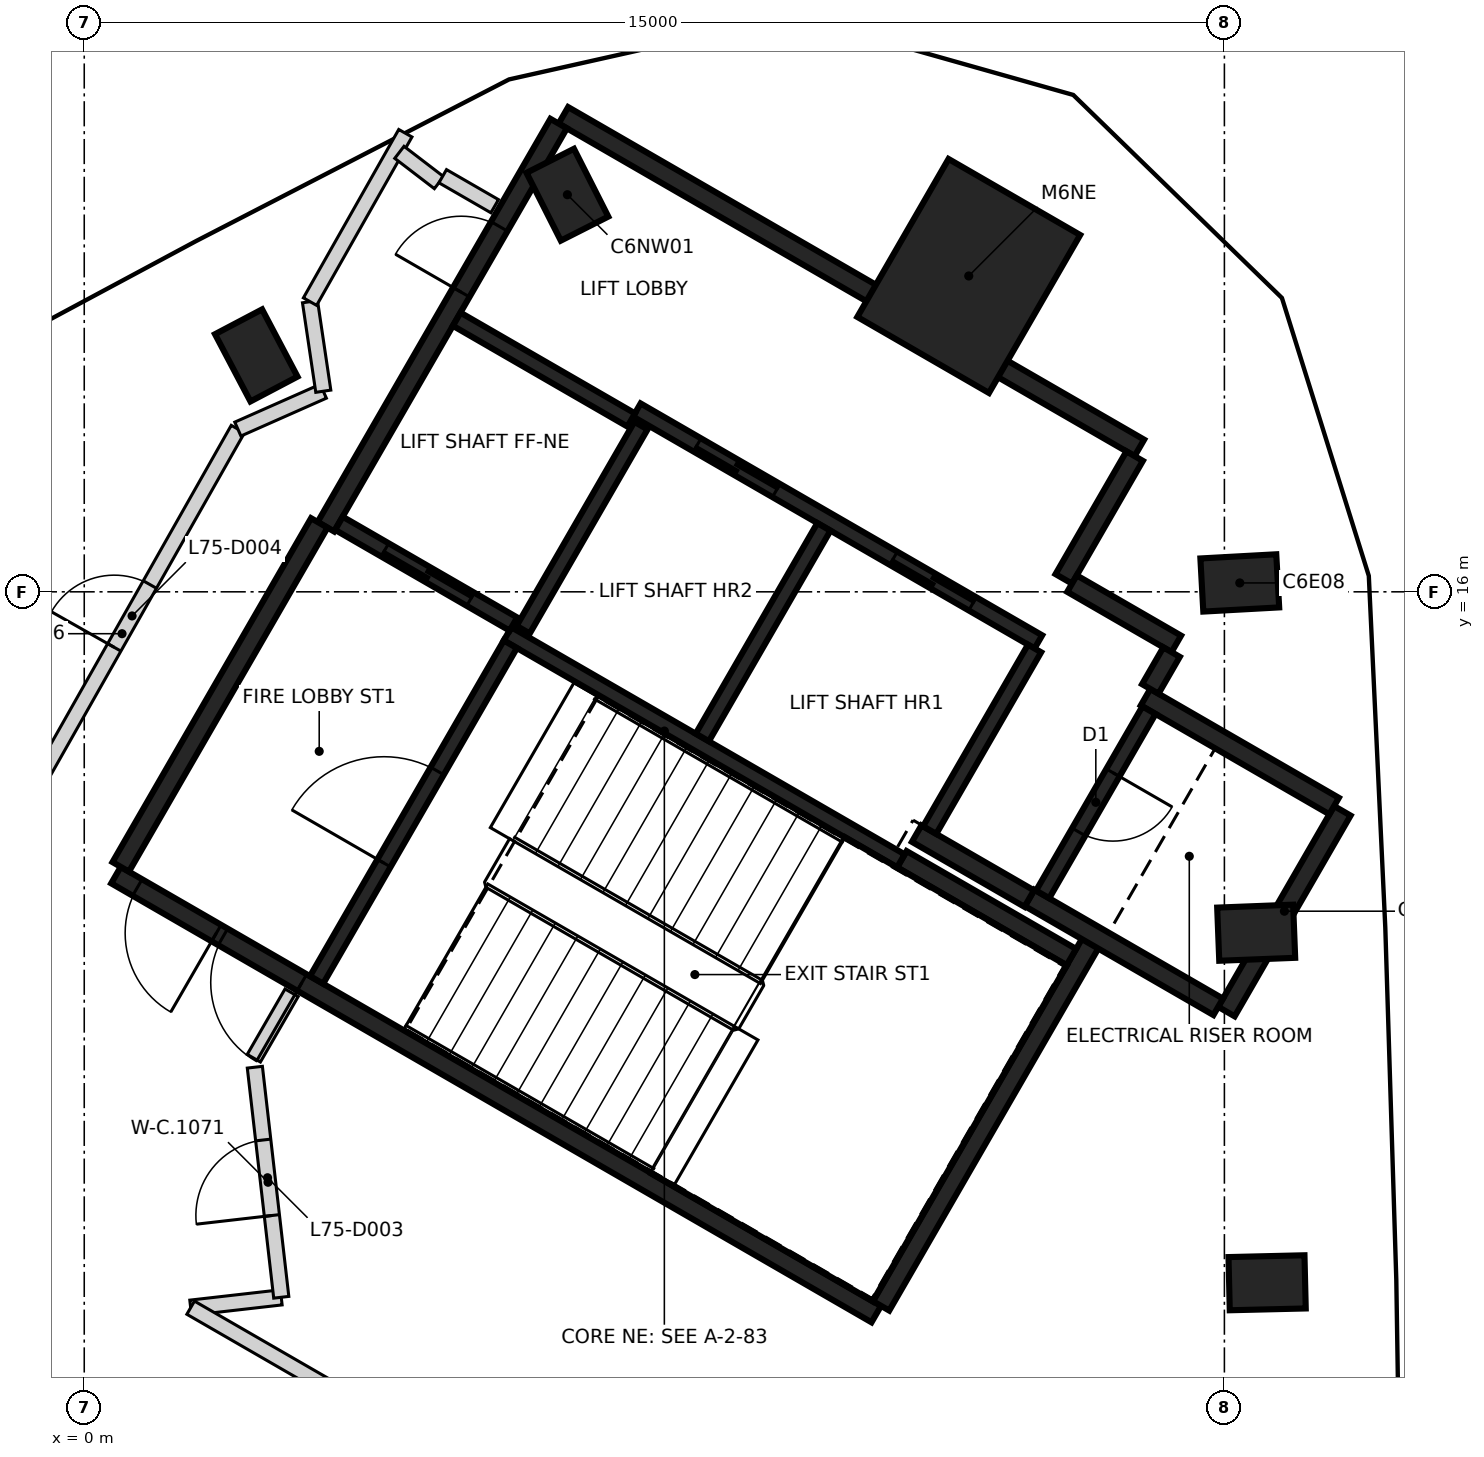
"""IFC4 building model, lengths in metres.
Left out: names, types, materials, properties, quantities, classifications, styles, units other than length and angle.
Written with IfcOpenShell. Run it as: python <this file> out.ifc"""

import sys

from ifc_helpers import new_model, si_unit, direction, frame, frame_2d, origin, origin_2d, place, context, subcontext, project, spatial, rectangle, extrude, element, fill, save


model = new_model("IFC4")
c1 = context("Model", 3, precision=1e-05, world=origin(), true_north=direction((0.0, 1.0)))
c2 = subcontext(c1, "Body", "Model", "MODEL_VIEW")
j1 = project(units=[si_unit("LENGTHUNIT", "METRE"), si_unit("PLANEANGLEUNIT", "RADIAN")], contexts=[c1])
p1 = place(None, origin())
s1 = spatial("IfcSite", under=j1, at=p1, CompositionType="ELEMENT")
p2 = place(p1, origin())
s2 = spatial("IfcBuilding", under=s1, at=p2, CompositionType="ELEMENT")
p3 = place(p2, frame((0.0, 0.0, 298.2)))
s3 = spatial("IfcBuildingStorey", under=s2, at=p3, CompositionType="ELEMENT", Elevation=298.2)
for number, where, z_axis, x_axis in (
    (1, (15.562, 6.91, -0.35), (0.0, 0.0, 1.0), (1.0, 0.024, 0.0)),
    (2, (15.418, 11.515, -0.35), (0.0, 0.0, 1.0), (0.999, 0.039, 0.0)),
    (3, (15.202, 16.117, -0.35), (0.0, 0.0, 1.0), (0.998, 0.055, 0.0)),
    (4, (6.356, 21.224, -0.35), (0.0, 0.0, 1.0), (-0.452, 0.892, 0.0)),
    (5, (2.263, 19.11, -0.35), (0.0, 0.0, 1.0), (-0.466, 0.885, 0.0)),
):
    element("IfcColumn", number, at=place(p3, frame(where, z_axis=z_axis, x_axis=x_axis)), inside=s3, PredefinedType="COLUMN", context=c2, shape_type="SweptSolid", body=[
        extrude(rectangle(XDim=1.0, YDim=0.7, at=origin_2d()), origin(), (0.0, 0.0, 1.0), 2.64),
    ])
p4 = place(p3, frame((11.637, 20.155, -0.35), z_axis=(0.0, 0.0, 1.0), x_axis=(0.5, 0.866025403784, 0.0)))
e6 = element("IfcColumn", 6, at=p4, inside=s3, PredefinedType="COLUMN", context=c2, shape_type="SweptSolid", body=[
    extrude(rectangle(XDim=2.4, YDim=2.0, at=origin_2d()), origin(), (0.0, 0.0, 1.0), 3.55),
])
p5 = place(p3, frame((10.42, 6.498, 0.0), z_axis=(0.0, 0.0, 1.0), x_axis=(-0.866021906294, 0.500006057782, 0.0)))
e7 = element("IfcWall", 7, at=p5, inside=s3, PredefinedType="SHEAR", context=c2, shape_type="SweptSolid", body=[
    extrude(rectangle(XDim=11.55, YDim=0.25, at=frame_2d((5.775, 0.0))), origin(), (0.0, 0.0, 1.0), 3.2),
])
p6 = place(p5, frame((10.025, 0.0, 0.0)))
e8 = element("IfcOpeningElement", 8, at=p6, cuts=e7, PredefinedType="OPENING", context=c2, shape_type="SweptSolid", body=[
    extrude(rectangle(XDim=1.2, YDim=2.1, at=frame_2d((0.6, 1.05))), frame((0.0, 0.135, 0.0), z_axis=(0.0, -1.0, 0.0), x_axis=(1.0, 0.0, 0.0)), (0.0, 0.0, 1.0), 0.27),
])
p7 = place(p5, frame((8.725, 0.0, 0.0)))
e9 = element("IfcOpeningElement", 9, at=p7, cuts=e7, PredefinedType="OPENING", context=c2, shape_type="SweptSolid", body=[
    extrude(rectangle(XDim=1.2, YDim=2.1, at=frame_2d((0.6, 1.05))), frame((0.0, 0.135, 0.0), z_axis=(0.0, -1.0, 0.0), x_axis=(1.0, 0.0, 0.0)), (0.0, 0.0, 1.0), 0.27),
])
p8 = place(p3, frame((6.304, 22.269, 0.0), z_axis=(0.0, 0.0, 1.0), x_axis=(0.866022959057, -0.500004234368, 0.0)))
e10 = element("IfcWall", 10, at=p8, inside=s3, PredefinedType="SHEAR", context=c2, shape_type="SweptSolid", body=[
    extrude(rectangle(XDim=8.75, YDim=0.25, at=frame_2d((4.375, 0.0))), origin(), (0.0, 0.0, 1.0), 3.2),
])
p9 = place(p3, frame((3.179, 16.856, 0.0), z_axis=(0.0, 0.0, 1.0), x_axis=(0.500001955336, 0.866024274868, 0.0)))
e11 = element("IfcWall", 11, at=p9, inside=s3, PredefinedType="SHEAR", context=c2, shape_type="SweptSolid", body=[
    extrude(rectangle(XDim=6.125, YDim=0.25, at=frame_2d((3.062, 0.0))), origin(), (0.0, 0.0, 1.0), 3.2),
])
p10 = place(p9, frame((3.563, 0.0, 0.0)))
e12 = element("IfcOpeningElement", 12, at=p10, cuts=e11, PredefinedType="OPENING", context=c2, shape_type="SweptSolid", body=[
    extrude(rectangle(XDim=1.0, YDim=2.1, at=frame_2d((0.5, 1.05))), frame((0.0, 0.135, 0.0), z_axis=(0.0, -1.0, 0.0), x_axis=(1.0, 0.0, 0.0)), (0.0, 0.0, 1.0), 0.27),
])
p11 = place(p3, frame((0.48, 12.381, 0.0), z_axis=(0.0, 0.0, 1.0), x_axis=(0.49999885962, 0.866026062182, 0.0)))
e13 = element("IfcWall", 13, at=p11, inside=s3, PredefinedType="SHEAR", context=c2, shape_type="SweptSolid", body=[
    extrude(rectangle(XDim=5.225, YDim=0.25, at=frame_2d((2.612, 0.0))), origin(), (0.0, 0.0, 1.0), 3.2),
])
p12 = place(p3, frame((13.238, 11.378, 0.0), z_axis=(0.0, 0.0, 1.0), x_axis=(-0.500008851346, -0.866020293397, 0.0)))
e14 = element("IfcWall", 14, at=p12, inside=s3, PredefinedType="SHEAR", context=c2, shape_type="SweptSolid", body=[
    extrude(rectangle(XDim=5.51, YDim=0.25, at=frame_2d((2.755, 0.0))), origin(), (0.0, 0.0, 1.0), 3.2),
])
p13 = place(p3, frame((16.552, 13.119, 0.0), z_axis=(0.0, 0.0, 1.0), x_axis=(-0.499978833458, -0.866037623948, 0.0)))
e15 = element("IfcWall", 15, at=p13, inside=s3, PredefinedType="SHEAR", context=c2, shape_type="SweptSolid", body=[
    extrude(rectangle(XDim=3.05, YDim=0.25, at=frame_2d((1.525, 0.0))), origin(), (0.0, 0.0, 1.0), 3.2),
])
p14 = place(p3, frame((14.918, 10.54, 0.0), z_axis=(0.0, 0.0, 1.0), x_axis=(-0.866063538972, 0.499933942099, 0.0)))
e16 = element("IfcWall", 16, at=p14, inside=s3, PredefinedType="SHEAR", context=c2, shape_type="SweptSolid", body=[
    extrude(rectangle(XDim=2.865, YDim=0.25, at=frame_2d((1.432, 0.0))), origin(), (0.0, 0.0, 1.0), 3.2),
])
p15 = place(p3, frame((13.963, 14.614, 0.0), z_axis=(0.0, 0.0, 1.0), x_axis=(0.866042235819, -0.499970844928, 0.0)))
e17 = element("IfcWall", 17, at=p15, inside=s3, PredefinedType="SHEAR", context=c2, shape_type="SweptSolid", body=[
    extrude(rectangle(XDim=2.865, YDim=0.25, at=frame_2d((1.432, 0.0))), origin(), (0.0, 0.0, 1.0), 3.2),
])
p16 = place(p3, frame((10.757, 12.481, 0.0), z_axis=(0.0, 0.0, 1.0), x_axis=(0.866022940537, -0.500004266446, 0.0)))
e18 = element("IfcWall", 18, at=p16, inside=s3, PredefinedType="SHEAR", context=c2, shape_type="SweptSolid", body=[
    extrude(rectangle(XDim=2.575, YDim=0.25, at=frame_2d((1.287, 0.0))), origin(), (0.0, 0.0, 1.0), 3.2),
])
p17 = place(p3, frame((13.819, 17.785, 0.0), z_axis=(0.0, 0.0, 1.0), x_axis=(-0.500039802285, -0.866002422705, 0.0)))
e19 = element("IfcWall", 19, at=p17, inside=s3, PredefinedType="SHEAR", context=c2, shape_type="SweptSolid", body=[
    extrude(rectangle(XDim=1.865, YDim=0.25, at=frame_2d((0.932, 0.0))), origin(), (0.0, 0.0, 1.0), 3.2),
])
p18 = place(p3, frame((12.433, 11.964, 0.0), z_axis=(0.0, 0.0, 1.0), x_axis=(-0.866038183914, 0.499977863513, 0.0)))
e20 = element("IfcWall", 20, at=p18, inside=s3, PredefinedType="SHEAR", context=c2, shape_type="SweptSolid", body=[
    extrude(rectangle(XDim=1.71, YDim=0.25, at=frame_2d((0.855, 0.0))), origin(), (0.0, 0.0, 1.0), 3.2),
])
p19 = place(p3, frame((12.995, 16.108, 0.0), z_axis=(0.0, 0.0, 1.0), x_axis=(0.866044474677, -0.49996696679, 0.0)))
e21 = element("IfcWall", 21, at=p19, inside=s3, PredefinedType="SHEAR", context=c2, shape_type="SweptSolid", body=[
    extrude(rectangle(XDim=1.584, YDim=0.25, at=frame_2d((0.792, 0.0))), origin(), (0.0, 0.0, 1.0), 3.2),
])
p20 = place(p3, frame((14.305, 15.207, 0.0), z_axis=(0.0, 0.0, 1.0), x_axis=(-0.499848422343, -0.866112899501, 0.0)))
e22 = element("IfcWall", 22, at=p20, inside=s3, PredefinedType="SHEAR", context=c2, shape_type="SweptSolid", body=[
    extrude(rectangle(XDim=0.559, YDim=0.25, at=frame_2d((0.28, 0.0))), origin(), (0.0, 0.0, 1.0), 3.2),
])
p21 = place(p3, frame((12.552, 15.342, 0.0), z_axis=(0.0, 0.0, 1.0), x_axis=(-0.866030299012, 0.499991521122, 0.0)))
e23 = element("IfcWall", 23, at=p21, inside=s3, PredefinedType="SHEAR", context=c2, shape_type="SweptSolid", body=[
    extrude(rectangle(XDim=6.1, YDim=0.2, at=frame_2d((3.05, 0.0))), origin(), (0.0, 0.0, 1.0), 3.2),
])
p22 = place(p21, frame((1.0, 0.0, 0.0)))
e24 = element("IfcOpeningElement", 24, at=p22, cuts=e23, PredefinedType="OPENING", context=c2, shape_type="SweptSolid", body=[
    extrude(rectangle(XDim=1.2, YDim=2.1, at=frame_2d((0.6, 1.05))), frame((0.0, 0.11, 0.0), z_axis=(0.0, -1.0, 0.0), x_axis=(1.0, 0.0, 0.0)), (0.0, 0.0, 1.0), 0.22),
])
p23 = place(p21, frame((3.982, 0.0, 0.0)))
e25 = element("IfcOpeningElement", 25, at=p23, cuts=e23, PredefinedType="OPENING", context=c2, shape_type="SweptSolid", body=[
    extrude(rectangle(XDim=1.2, YDim=2.1, at=frame_2d((0.6, 1.05))), frame((0.0, 0.11, 0.0), z_axis=(0.0, -1.0, 0.0), x_axis=(1.0, 0.0, 0.0)), (0.0, 0.0, 1.0), 0.22),
])
p24 = place(p3, frame((10.743, 12.46, 0.0), z_axis=(0.0, 0.0, 1.0), x_axis=(-0.866018848283, 0.500011354289, 0.0)))
e26 = element("IfcWall", 26, at=p24, inside=s3, PredefinedType="SHEAR", context=c2, shape_type="SweptSolid", body=[
    extrude(rectangle(XDim=5.974, YDim=0.2, at=frame_2d((2.987, 0.0))), origin(), (0.0, 0.0, 1.0), 3.2),
])
p25 = place(p3, frame((3.057, 10.895, 0.0), z_axis=(0.0, 0.0, 1.0), x_axis=(0.500027839223, 0.866009330205, 0.0)))
e27 = element("IfcWall", 27, at=p25, inside=s3, PredefinedType="SHEAR", context=c2, shape_type="SweptSolid", body=[
    extrude(rectangle(XDim=5.098, YDim=0.2, at=frame_2d((2.549, 0.0))), origin(), (0.0, 0.0, 1.0), 3.2),
])
p26 = place(p25, frame((1.774, 0.0, 0.0)))
e28 = element("IfcOpeningElement", 28, at=p26, cuts=e27, PredefinedType="OPENING", context=c2, shape_type="SweptSolid", body=[
    extrude(rectangle(XDim=1.4, YDim=2.1, at=frame_2d((0.7, 1.05))), frame((0.0, 0.11, 0.0), z_axis=(0.0, -1.0, 0.0), x_axis=(1.0, 0.0, 0.0)), (0.0, 0.0, 1.0), 0.22),
])
p27 = place(p3, frame((8.132, 14.084, 0.0), z_axis=(0.0, 0.0, 1.0), x_axis=(0.500030834389, 0.86600760081, 0.0)))
e29 = element("IfcWall", 29, at=p27, inside=s3, PredefinedType="SHEAR", context=c2, shape_type="SweptSolid", body=[
    extrude(rectangle(XDim=3.198, YDim=0.2, at=frame_2d((1.599, 0.0))), origin(), (0.0, 0.0, 1.0), 3.2),
])
p28 = place(p3, frame((14.008, 14.442, 0.0), z_axis=(0.0, 0.0, 1.0), x_axis=(-0.499986818241, -0.866033014143, 0.0)))
e30 = element("IfcWall", 30, at=p28, inside=s3, PredefinedType="SHEAR", context=c2, shape_type="SweptSolid", body=[
    extrude(rectangle(XDim=2.798, YDim=0.2, at=frame_2d((1.399, 0.0))), origin(), (0.0, 0.0, 1.0), 3.2),
])
p29 = place(p28, frame((0.949, 0.0, 0.0)))
e31 = element("IfcOpeningElement", 31, at=p29, cuts=e30, PredefinedType="OPENING", context=c2, shape_type="SweptSolid", body=[
    extrude(rectangle(XDim=0.9, YDim=2.1, at=frame_2d((0.45, 1.05))), frame((0.0, 0.11, 0.0), z_axis=(0.0, -1.0, 0.0), x_axis=(1.0, 0.0, 0.0)), (0.0, 0.0, 1.0), 0.22),
])
p30 = place(p3, frame((12.502, 15.255, 0.0), z_axis=(0.0, 0.0, 1.0), x_axis=(-0.499965018551, -0.866045599391, 0.0)))
e32 = element("IfcWall", 32, at=p30, inside=s3, PredefinedType="SHEAR", context=c2, shape_type="SweptSolid", body=[
    extrude(rectangle(XDim=2.759, YDim=0.2, at=frame_2d((1.379, 0.0))), origin(), (0.0, 0.0, 1.0), 3.2),
])
p31 = place(p3, frame((7.324, 18.187, 0.0), z_axis=(0.0, 0.0, 1.0), x_axis=(-0.499967891604, -0.866043940782, 0.0)))
e33 = element("IfcWall", 33, at=p31, inside=s3, PredefinedType="SHEAR", context=c2, shape_type="SweptSolid", body=[
    extrude(rectangle(XDim=3.1, YDim=0.2, at=frame_2d((1.55, 0.0))), origin(), (0.0, 0.0, 1.0), 3.2),
])
p32 = place(p3, frame((5.646, 15.576, 0.0), z_axis=(0.0, 0.0, 1.0), x_axis=(-0.866018407898, 0.500012117035, 0.0)))
e34 = element("IfcWall", 34, at=p32, inside=s3, PredefinedType="SHEAR", context=c2, shape_type="SweptSolid", body=[
    extrude(rectangle(XDim=2.651, YDim=0.2, at=frame_2d((1.325, 0.0))), origin(), (0.0, 0.0, 1.0), 3.2),
])
p33 = place(p32, frame((0.652, 0.0, 0.0)))
e35 = element("IfcOpeningElement", 35, at=p33, cuts=e34, PredefinedType="OPENING", context=c2, shape_type="SweptSolid", body=[
    extrude(rectangle(XDim=1.3, YDim=2.1, at=frame_2d((0.65, 1.05))), frame((0.0, 0.11, 0.0), z_axis=(0.0, -1.0, 0.0), x_axis=(1.0, 0.0, 0.0)), (0.0, 0.0, 1.0), 0.22),
])
p34 = place(p3, frame((7.196, 18.26, 0.0), z_axis=(0.0, 0.0, 1.0), x_axis=(-0.866018407898, 0.500012117035, 0.0)))
e36 = element("IfcWall", 36, at=p34, inside=s3, PredefinedType="SHEAR", context=c2, shape_type="SweptSolid", body=[
    extrude(rectangle(XDim=2.651, YDim=0.2, at=frame_2d((1.325, 0.0))), origin(), (0.0, 0.0, 1.0), 3.2),
])
p35 = place(p3, frame((-1.027, 12.757, 0.0), z_axis=(0.0, 0.0, 1.0), x_axis=(0.492663063759, 0.870220147783, 0.0)))
e37 = element("IfcWall", 37, at=p35, inside=s3, PredefinedType="PARTITIONING", context=c2, shape_type="SweptSolid", body=[
    extrude(rectangle(XDim=6.187, YDim=0.2, at=frame_2d((3.094, 0.0))), origin(), (0.0, 0.0, 1.0), 3.2),
])
p36 = place(p35, frame((2.887, 0.0, 0.0)))
e38 = element("IfcOpeningElement", 38, at=p36, cuts=e37, PredefinedType="OPENING", context=c2, shape_type="SweptSolid", body=[
    extrude(rectangle(XDim=0.95, YDim=2.1, at=frame_2d((0.475, 1.05))), frame((0.0, 0.11, 0.0), z_axis=(0.0, -1.0, 0.0), x_axis=(1.0, 0.0, 0.0)), (0.0, 0.0, 1.0), 0.22),
])
p37 = place(p3, frame((1.4, 6.582, 0.0), z_axis=(0.0, 0.0, 1.0), x_axis=(0.993556915844, 0.11333426216, 0.0)))
e39 = element("IfcWall", 39, at=p37, inside=s3, PredefinedType="PARTITIONING", context=c2, shape_type="SweptSolid", body=[
    extrude(rectangle(XDim=1.2, YDim=0.2, at=frame_2d((0.6, 0.0))), origin(), (0.0, 0.0, 1.0), 3.2),
])
p38 = place(p3, frame((1.4, 6.582, 0.0), z_axis=(0.0, 0.0, 1.0), x_axis=(0.866066271601, -0.499929208183, 0.0)))
e40 = element("IfcWall", 40, at=p38, inside=s3, PredefinedType="PARTITIONING", context=c2, shape_type="SweptSolid", body=[
    extrude(rectangle(XDim=2.078, YDim=0.2, at=frame_2d((1.039, 0.0))), origin(), (0.0, 0.0, 1.0), 3.2),
])
p39 = place(p3, frame((2.021, 18.141, 0.0), z_axis=(0.0, 0.0, 1.0), x_axis=(0.914343087003, 0.404940389748, 0.0)))
e41 = element("IfcWall", 41, at=p39, inside=s3, PredefinedType="PARTITIONING", context=c2, shape_type="SweptSolid", body=[
    extrude(rectangle(XDim=1.229, YDim=0.2, at=frame_2d((0.615, 0.0))), origin(), (0.0, 0.0, 1.0), 3.2),
])
p40 = place(p3, frame((2.592, 6.719, 0.0), z_axis=(0.0, 0.0, 1.0), x_axis=(-0.114027951455, 0.993477541914, 0.0)))
e42 = element("IfcWall", 42, at=p40, inside=s3, PredefinedType="PARTITIONING", context=c2, shape_type="SweptSolid", body=[
    extrude(rectangle(XDim=3.047, YDim=0.2, at=frame_2d((1.523, 0.0))), origin(), (0.0, 0.0, 1.0), 3.2),
])
p41 = place(p40, frame((1.083, 0.0, 0.0)))
e43 = element("IfcOpeningElement", 43, at=p41, cuts=e42, PredefinedType="OPENING", context=c2, shape_type="SweptSolid", body=[
    extrude(rectangle(XDim=1.0, YDim=2.1, at=frame_2d((0.5, 1.05))), frame((0.0, 0.11, 0.0), z_axis=(0.0, -1.0, 0.0), x_axis=(1.0, 0.0, 0.0)), (0.0, 0.0, 1.0), 0.22),
])
p42 = place(p3, frame((2.231, 9.864, 0.0), z_axis=(0.0, 0.0, 1.0), x_axis=(0.499942098031, 0.866058830921, 0.0)))
e44 = element("IfcWall", 44, at=p42, inside=s3, PredefinedType="PARTITIONING", context=c2, shape_type="SweptSolid", body=[
    extrude(rectangle(XDim=0.994, YDim=0.2, at=frame_2d((0.497, 0.0))), origin(), (0.0, 0.0, 1.0), 3.2),
])
p43 = place(p3, frame((2.97, 19.817, 0.0), z_axis=(0.0, 0.0, 1.0), x_axis=(0.146986994932, -0.989138424752, 0.0)))
e45 = element("IfcWall", 45, at=p43, inside=s3, PredefinedType="PARTITIONING", context=c2, shape_type="SweptSolid", body=[
    extrude(rectangle(XDim=1.191, YDim=0.2, at=frame_2d((0.595, 0.0))), origin(), (0.0, 0.0, 1.0), 2.29),
])
p44 = place(p3, frame((2.97, 19.818, 0.0), z_axis=(0.0, 0.0, 1.0), x_axis=(0.492727027301, 0.870183932607, 0.0)))
e46 = element("IfcWall", 46, at=p44, inside=s3, PredefinedType="PARTITIONING", context=c2, shape_type="SweptSolid", body=[
    extrude(rectangle(XDim=2.546, YDim=0.2, at=frame_2d((1.273, 0.0))), origin(), (0.0, 0.0, 1.0), 3.2),
])
p45 = place(p3, frame((4.146, 21.782, 0.0), z_axis=(0.0, 0.0, 1.0), x_axis=(0.793977493121, -0.607947152652, 0.0)))
e47 = element("IfcWall", 47, at=p45, inside=s3, PredefinedType="PARTITIONING", context=c2, shape_type="SweptSolid", body=[
    extrude(rectangle(XDim=0.656, YDim=0.2, at=frame_2d((0.328, 0.0))), origin(), (0.0, 0.0, 1.0), 3.2),
])
p46 = place(p3, frame((4.716, 21.468, 0.0), z_axis=(0.0, 0.0, 1.0), x_axis=(0.865912682783, -0.500195187698, 0.0)))
e48 = element("IfcWall", 48, at=p46, inside=s3, PredefinedType="PARTITIONING", context=c2, shape_type="SweptSolid", body=[
    extrude(rectangle(XDim=0.79, YDim=0.2, at=frame_2d((0.395, 0.0))), origin(), (0.0, 0.0, 1.0), 3.2),
])
p47 = place(p33, origin())
e49 = element("IfcDoor", 49, at=p47, inside=s3, OperationType="SLIDING_TO_LEFT", PredefinedType="DOOR", context=c2, shape_type="SweptSolid", body=[
    extrude(rectangle(XDim=1.3, YDim=2.1, at=frame_2d((0.65, 1.05))), frame((0.0, 0.025, 0.0), z_axis=(0.0, -1.0, 0.0), x_axis=(1.0, 0.0, 0.0)), (0.0, 0.0, 1.0), 0.05),
])
fill(e35, e49)
p48 = place(p22, origin())
e50 = element("IfcDoor", 50, at=p48, inside=s3, OperationType="DOUBLE_DOOR_SLIDING", PredefinedType="DOOR", context=c2, shape_type="SweptSolid", body=[
    extrude(rectangle(XDim=1.2, YDim=2.1, at=frame_2d((0.6, 1.05))), frame((0.0, 0.025, 0.0), z_axis=(0.0, -1.0, 0.0), x_axis=(1.0, 0.0, 0.0)), (0.0, 0.0, 1.0), 0.05),
])
fill(e24, e50)
p49 = place(p23, origin())
e51 = element("IfcDoor", 51, at=p49, inside=s3, OperationType="DOUBLE_DOOR_SLIDING", PredefinedType="DOOR", context=c2, shape_type="SweptSolid", body=[
    extrude(rectangle(XDim=1.2, YDim=2.1, at=frame_2d((0.6, 1.05))), frame((0.0, 0.025, 0.0), z_axis=(0.0, -1.0, 0.0), x_axis=(1.0, 0.0, 0.0)), (0.0, 0.0, 1.0), 0.05),
])
fill(e25, e51)
p50 = place(p10, origin())
e52 = element("IfcDoor", 52, at=p50, inside=s3, OperationType="SINGLE_SWING_LEFT", PredefinedType="DOOR", context=c2, shape_type="SweptSolid", body=[
    extrude(rectangle(XDim=1.0, YDim=2.1, at=frame_2d((0.5, 1.05))), frame((0.0, 0.025, 0.0), z_axis=(0.0, -1.0, 0.0), x_axis=(1.0, 0.0, 0.0)), (0.0, 0.0, 1.0), 0.05),
])
fill(e12, e52)
p51 = place(p6, origin())
e53 = element("IfcDoor", 53, at=p51, inside=s3, OperationType="SINGLE_SWING_LEFT", PredefinedType="DOOR", context=c2, shape_type="SweptSolid", body=[
    extrude(rectangle(XDim=1.2, YDim=2.1, at=frame_2d((0.6, 1.05))), frame((0.0, 0.025, 0.0), z_axis=(0.0, -1.0, 0.0), x_axis=(1.0, 0.0, 0.0)), (0.0, 0.0, 1.0), 0.05),
])
fill(e8, e53)
p52 = place(p7, origin())
e54 = element("IfcDoor", 54, at=p52, inside=s3, OperationType="SINGLE_SWING_RIGHT", PredefinedType="DOOR", context=c2, shape_type="SweptSolid", body=[
    extrude(rectangle(XDim=1.2, YDim=2.1, at=frame_2d((0.6, 1.05))), frame((0.0, 0.025, 0.0), z_axis=(0.0, -1.0, 0.0), x_axis=(1.0, 0.0, 0.0)), (0.0, 0.0, 1.0), 0.05),
])
fill(e9, e54)
p53 = place(p26, origin())
e55 = element("IfcDoor", 55, at=p53, inside=s3, OperationType="SINGLE_SWING_LEFT", PredefinedType="DOOR", context=c2, shape_type="SweptSolid", body=[
    extrude(rectangle(XDim=1.4, YDim=2.1, at=frame_2d((0.7, 1.05))), frame((0.0, 0.025, 0.0), z_axis=(0.0, -1.0, 0.0), x_axis=(1.0, 0.0, 0.0)), (0.0, 0.0, 1.0), 0.05),
])
fill(e28, e55)
p54 = place(p29, origin())
e56 = element("IfcDoor", 56, at=p54, inside=s3, OperationType="SINGLE_SWING_RIGHT", PredefinedType="DOOR", context=c2, shape_type="SweptSolid", body=[
    extrude(rectangle(XDim=0.9, YDim=2.1, at=frame_2d((0.45, 1.05))), frame((0.0, 0.025, 0.0), z_axis=(0.0, -1.0, 0.0), x_axis=(1.0, 0.0, 0.0)), (0.0, 0.0, 1.0), 0.05),
])
fill(e31, e56)
p55 = place(p41, origin())
e57 = element("IfcDoor", 57, at=p55, inside=s3, OperationType="SINGLE_SWING_LEFT", PredefinedType="DOOR", context=c2, shape_type="SweptSolid", body=[
    extrude(rectangle(XDim=1.0, YDim=2.1, at=frame_2d((0.5, 1.05))), frame((0.0, 0.025, 0.0), z_axis=(0.0, -1.0, 0.0), x_axis=(1.0, 0.0, 0.0)), (0.0, 0.0, 1.0), 0.05),
])
fill(e43, e57)
p56 = place(p36, origin())
e58 = element("IfcDoor", 58, at=p56, inside=s3, OperationType="SINGLE_SWING_LEFT", PredefinedType="DOOR", context=c2, shape_type="SweptSolid", body=[
    extrude(rectangle(XDim=0.95, YDim=2.1, at=frame_2d((0.475, 1.05))), frame((0.0, 0.025, 0.0), z_axis=(0.0, -1.0, 0.0), x_axis=(1.0, 0.0, 0.0)), (0.0, 0.0, 1.0), 0.05),
])
fill(e38, e58)
save(model, sys.argv[1])
